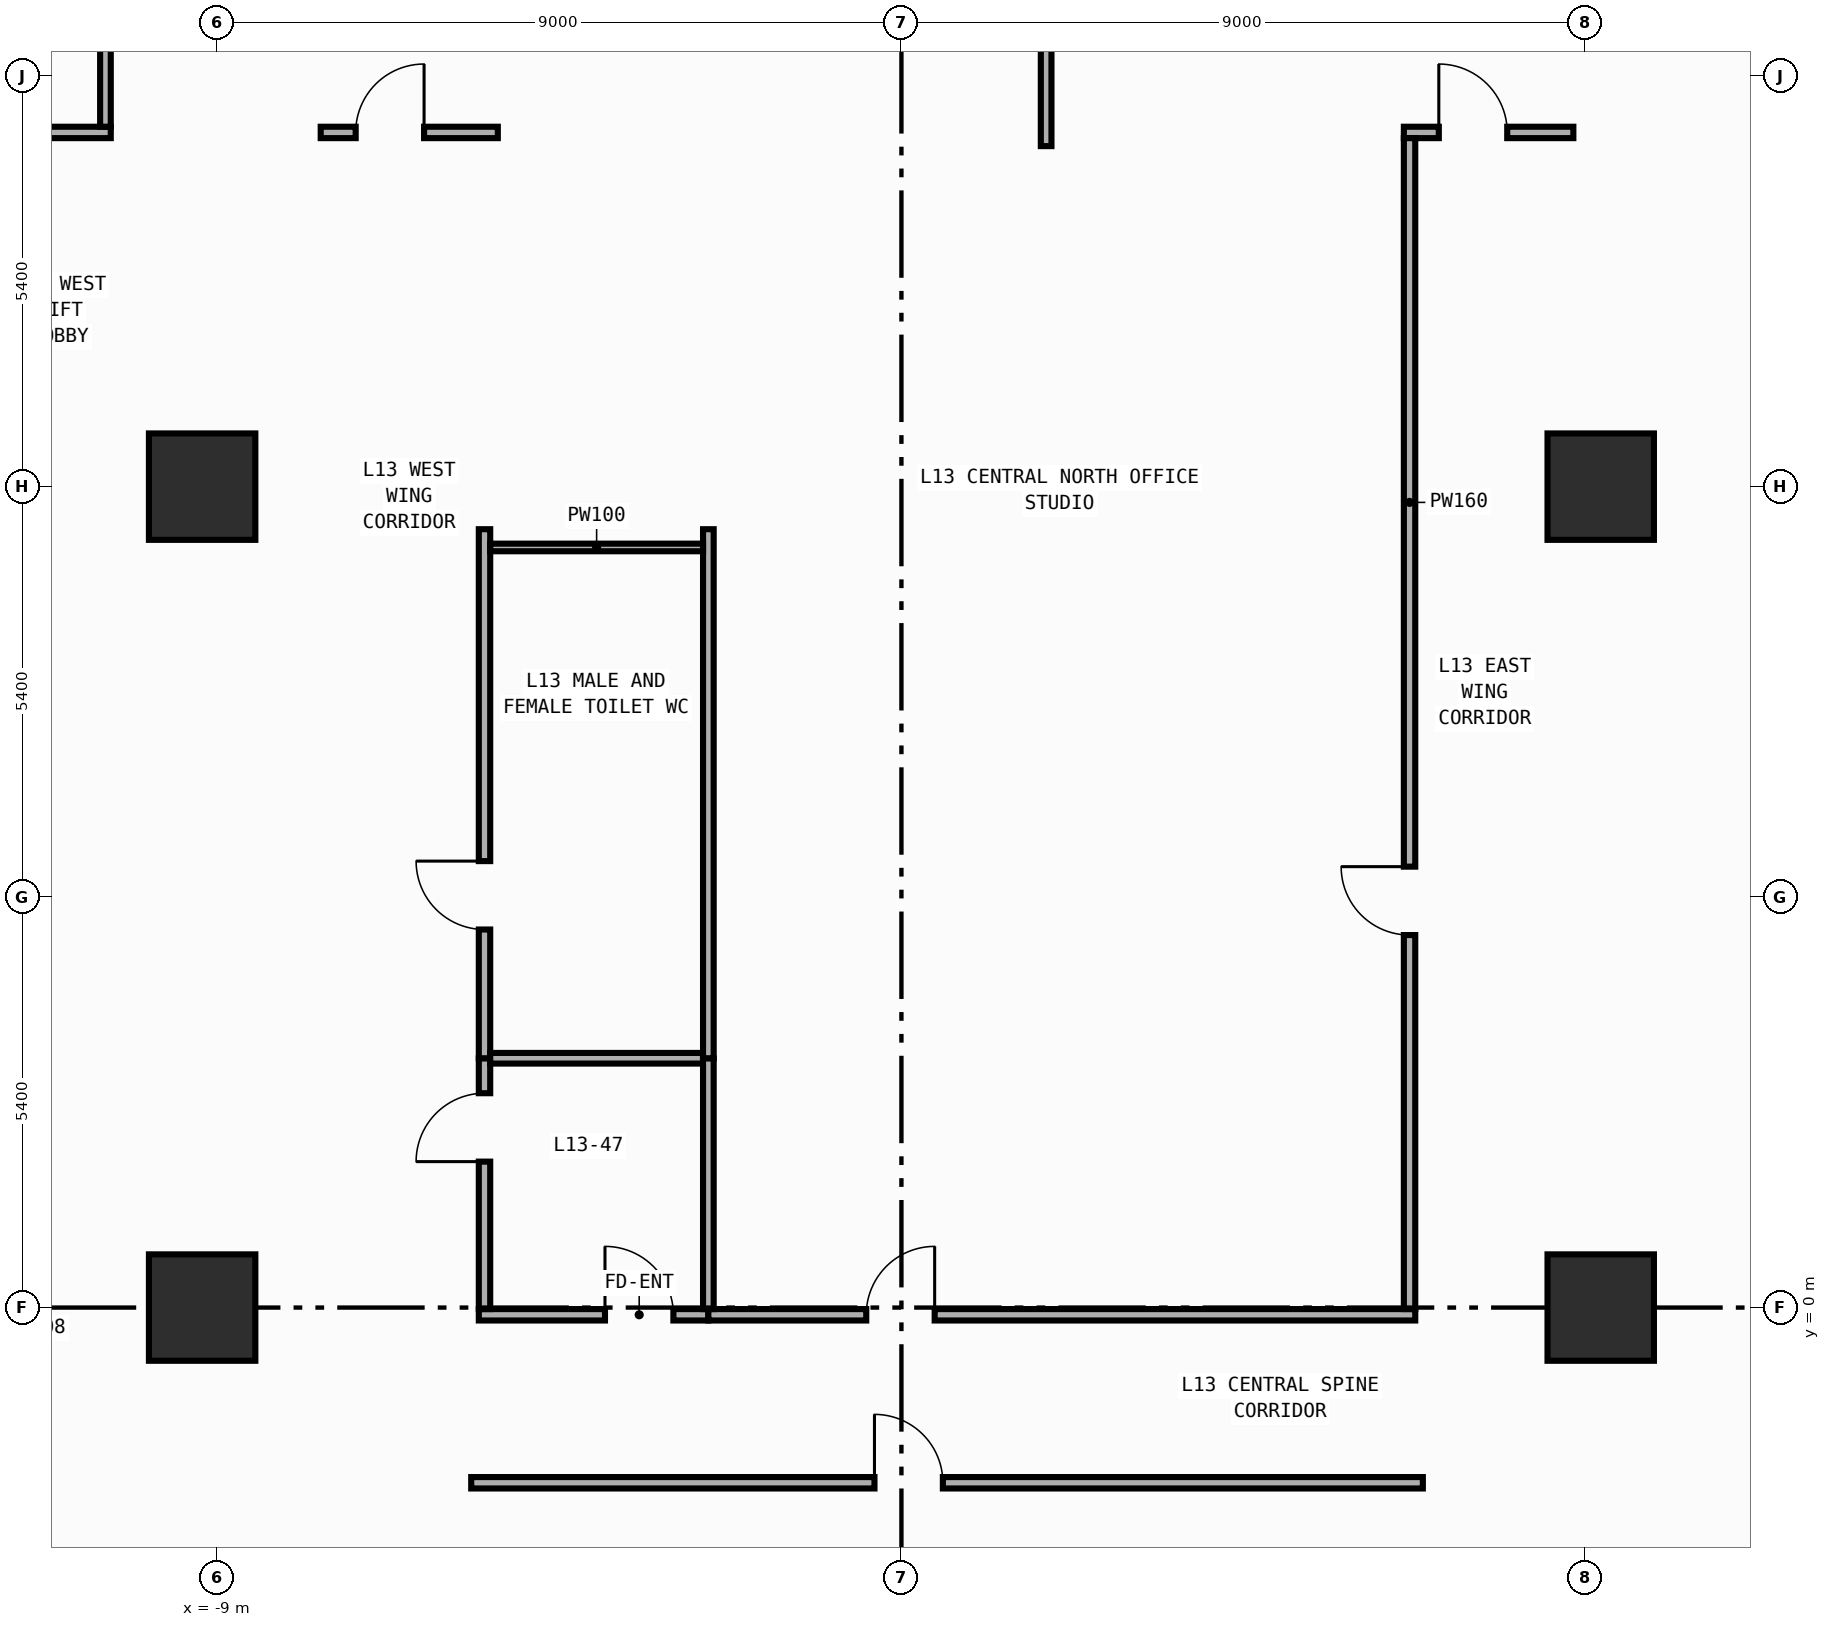
"""IFC4 building model, lengths in metres.
Left out: names, types, materials, properties, quantities, classifications, styles, units other than length and angle.
Written with IfcOpenShell. Run it as: python <this file> out.ifc"""

import sys

from ifc_helpers import new_model, si_unit, direction, frame, frame_2d, origin, origin_2d, place, context, subcontext, project, spatial, rectangle, extrude, element, fill, save


model = new_model("IFC4")
c1 = context("Model", 3, precision=1e-05, world=origin(), true_north=direction((0.0, 1.0)))
c2 = subcontext(c1, "Body", "Model", "MODEL_VIEW")
j1 = project(units=[si_unit("LENGTHUNIT", "METRE"), si_unit("PLANEANGLEUNIT", "RADIAN")], contexts=[c1])
p1 = place(None, origin())
s1 = spatial("IfcSite", under=j1, at=p1, CompositionType="ELEMENT")
p2 = place(p1, origin())
s2 = spatial("IfcBuilding", under=s1, at=p2, CompositionType="ELEMENT")
p3 = place(p2, frame((0.0, 0.0, 55.4)))
s3 = spatial("IfcBuildingStorey", under=s2, at=p3, CompositionType="ELEMENT", Elevation=55.4)
for number, where, z_axis, x_axis in (
    (1, (-9.2, 0.0, 0.0), (0.0, 0.0, 1.0), (1.0, 0.0, 0.0)),
    (2, (-9.2, 10.8, 0.0), (0.0, 0.0, 1.0), (1.0, 0.0, 0.0)),
    (3, (9.2, 0.0, 0.0), (0.0, 0.0, 1.0), (1.0, 0.0, 0.0)),
    (4, (9.2, 10.8, 0.0), (0.0, 0.0, 1.0), (1.0, 0.0, 0.0)),
):
    element("IfcColumn", number, at=place(p3, frame(where, z_axis=z_axis, x_axis=x_axis)), inside=s3, PredefinedType="COLUMN", context=c2, shape_type="SweptSolid", body=[
        extrude(rectangle(XDim=1.4, YDim=1.4, at=origin_2d()), origin(), (0.0, 0.0, 1.0), 4.2),
    ])
p4 = place(p3, frame((-11.99, 15.46, 0.0), z_axis=(0.0, 0.0, 1.0), x_axis=(1.0, 0.0, 0.0)))
e5 = element("IfcWall", 5, at=p4, inside=s3, PredefinedType="PARTITIONING", context=c2, shape_type="SweptSolid", body=[
    extrude(rectangle(XDim=1.588, YDim=0.15, at=frame_2d((0.794, 0.0))), origin(), (0.0, 0.0, 1.0), 3.94),
])
p5 = place(p3, frame((-5.56, -0.095, 0.0), z_axis=(0.0, 0.0, 1.0), x_axis=(1.0, 0.0, 0.0)))
e6 = element("IfcWall", 6, at=p5, inside=s3, PredefinedType="PARTITIONING", context=c2, shape_type="SweptSolid", body=[
    extrude(rectangle(XDim=3.02, YDim=0.15, at=frame_2d((1.51, 0.0))), origin(), (0.0, 0.0, 1.0), 3.14),
])
p6 = place(p5, frame((1.66, 0.0, 0.0)))
e7 = element("IfcOpeningElement", 7, at=p6, cuts=e6, PredefinedType="OPENING", context=c2, shape_type="SweptSolid", body=[
    extrude(rectangle(XDim=0.9, YDim=2.15, at=frame_2d((0.45, 1.075))), frame((0.0, 0.085, 0.0), z_axis=(0.0, -1.0, 0.0), x_axis=(1.0, 0.0, 0.0)), (0.0, 0.0, 1.0), 0.17),
])
p7 = place(p3, frame((-2.54, -0.095, 0.0), z_axis=(0.0, 0.0, 1.0), x_axis=(1.0, 0.0, 0.0)))
e8 = element("IfcWall", 8, at=p7, inside=s3, PredefinedType="PARTITIONING", context=c2, shape_type="SweptSolid", body=[
    extrude(rectangle(XDim=9.3, YDim=0.15, at=frame_2d((4.65, 0.0))), origin(), (0.0, 0.0, 1.0), 3.14),
])
p8 = place(p7, frame((2.077, 0.0, 0.0)))
e9 = element("IfcOpeningElement", 9, at=p8, cuts=e8, PredefinedType="OPENING", context=c2, shape_type="SweptSolid", body=[
    extrude(rectangle(XDim=0.9, YDim=2.15, at=frame_2d((0.45, 1.075))), frame((0.0, 0.085, 0.0), z_axis=(0.0, -1.0, 0.0), x_axis=(1.0, 0.0, 0.0)), (0.0, 0.0, 1.0), 0.17),
])
p9 = place(p3, frame((-5.66, -2.305, 0.0), z_axis=(0.0, 0.0, 1.0), x_axis=(1.0, 0.0, 0.0)))
e10 = element("IfcWall", 10, at=p9, inside=s3, PredefinedType="PARTITIONING", context=c2, shape_type="SweptSolid", body=[
    extrude(rectangle(XDim=12.52, YDim=0.15, at=frame_2d((6.26, 0.0))), origin(), (0.0, 0.0, 1.0), 3.94),
])
p10 = place(p9, frame((5.305, 0.0, 0.0)))
e11 = element("IfcOpeningElement", 11, at=p10, cuts=e10, PredefinedType="OPENING", context=c2, shape_type="SweptSolid", body=[
    extrude(rectangle(XDim=0.9, YDim=2.15, at=frame_2d((0.45, 1.075))), frame((0.0, 0.085, 0.0), z_axis=(0.0, -1.0, 0.0), x_axis=(1.0, 0.0, 0.0)), (0.0, 0.0, 1.0), 0.17),
])
p11 = place(p3, frame((-7.64, 15.46, 0.0), z_axis=(0.0, 0.0, 1.0), x_axis=(1.0, 0.0, 0.0)))
e12 = element("IfcWall", 12, at=p11, inside=s3, PredefinedType="PARTITIONING", context=c2, shape_type="SweptSolid", body=[
    extrude(rectangle(XDim=2.33, YDim=0.15, at=frame_2d((1.165, 0.0))), origin(), (0.0, 0.0, 1.0), 3.94),
])
p12 = place(p11, frame((0.46, 0.0, 0.0)))
e13 = element("IfcOpeningElement", 13, at=p12, cuts=e12, PredefinedType="OPENING", context=c2, shape_type="SweptSolid", body=[
    extrude(rectangle(XDim=0.9, YDim=2.15, at=frame_2d((0.45, 1.075))), frame((0.0, 0.085, 0.0), z_axis=(0.0, -1.0, 0.0), x_axis=(1.0, 0.0, 0.0)), (0.0, 0.0, 1.0), 0.17),
])
p13 = place(p3, frame((-5.485, -0.02, 0.0), z_axis=(0.0, 0.0, 1.0), x_axis=(0.0, 1.0, 0.0)))
e14 = element("IfcWall", 14, at=p13, inside=s3, PredefinedType="PARTITIONING", context=c2, shape_type="SweptSolid", body=[
    extrude(rectangle(XDim=3.3, YDim=0.15, at=frame_2d((1.65, 0.0))), origin(), (0.0, 0.0, 1.0), 3.94),
])
p14 = place(p13, frame((1.94, 0.0, 0.0)))
e15 = element("IfcOpeningElement", 15, at=p14, cuts=e14, PredefinedType="OPENING", context=c2, shape_type="SweptSolid", body=[
    extrude(rectangle(XDim=0.9, YDim=2.15, at=frame_2d((0.45, 1.075))), frame((0.0, 0.085, 0.0), z_axis=(0.0, -1.0, 0.0), x_axis=(1.0, 0.0, 0.0)), (0.0, 0.0, 1.0), 0.17),
])
p15 = place(p3, frame((-5.485, 3.28, 0.0), z_axis=(0.0, 0.0, 1.0), x_axis=(0.0, 1.0, 0.0)))
e16 = element("IfcWall", 16, at=p15, inside=s3, PredefinedType="PARTITIONING", context=c2, shape_type="SweptSolid", body=[
    extrude(rectangle(XDim=6.96, YDim=0.15, at=frame_2d((3.48, 0.0))), origin(), (0.0, 0.0, 1.0), 3.94),
])
p16 = place(p15, frame((1.694, 0.0, 0.0)))
e17 = element("IfcOpeningElement", 17, at=p16, cuts=e16, PredefinedType="OPENING", context=c2, shape_type="SweptSolid", body=[
    extrude(rectangle(XDim=0.9, YDim=2.15, at=frame_2d((0.45, 1.075))), frame((0.0, 0.085, 0.0), z_axis=(0.0, -1.0, 0.0), x_axis=(1.0, 0.0, 0.0)), (0.0, 0.0, 1.0), 0.17),
])
p17 = place(p3, frame((6.61, 15.46, 0.0), z_axis=(0.0, 0.0, 1.0), x_axis=(1.0, 0.0, 0.0)))
e18 = element("IfcWall", 18, at=p17, inside=s3, PredefinedType="PARTITIONING", context=c2, shape_type="SweptSolid", body=[
    extrude(rectangle(XDim=2.23, YDim=0.15, at=frame_2d((1.115, 0.0))), origin(), (0.0, 0.0, 1.0), 3.94),
])
p18 = place(p17, frame((0.46, 0.0, 0.0)))
e19 = element("IfcOpeningElement", 19, at=p18, cuts=e18, PredefinedType="OPENING", context=c2, shape_type="SweptSolid", body=[
    extrude(rectangle(XDim=0.9, YDim=2.15, at=frame_2d((0.45, 1.075))), frame((0.0, 0.085, 0.0), z_axis=(0.0, -1.0, 0.0), x_axis=(1.0, 0.0, 0.0)), (0.0, 0.0, 1.0), 0.17),
])
p19 = place(p3, frame((6.685, -0.02, 0.0), z_axis=(0.0, 0.0, 1.0), x_axis=(0.0, 1.0, 0.0)))
e20 = element("IfcWall", 20, at=p19, inside=s3, PredefinedType="PARTITIONING", context=c2, shape_type="SweptSolid", body=[
    extrude(rectangle(XDim=15.405, YDim=0.15, at=frame_2d((7.703, 0.0))), origin(), (0.0, 0.0, 1.0), 3.94),
])
p20 = place(p19, frame((4.921, 0.0, 0.0)))
e21 = element("IfcOpeningElement", 21, at=p20, cuts=e20, PredefinedType="OPENING", context=c2, shape_type="SweptSolid", body=[
    extrude(rectangle(XDim=0.9, YDim=2.15, at=frame_2d((0.45, 1.075))), frame((0.0, 0.085, 0.0), z_axis=(0.0, -1.0, 0.0), x_axis=(1.0, 0.0, 0.0)), (0.0, 0.0, 1.0), 0.17),
])
p21 = place(p3, frame((-10.472, 15.535, 0.0), z_axis=(0.0, 0.0, 1.0), x_axis=(0.0, 1.0, 0.0)))
e22 = element("IfcWall", 22, at=p21, inside=s3, PredefinedType="PARTITIONING", context=c2, shape_type="SweptSolid", body=[
    extrude(rectangle(XDim=11.32, YDim=0.14, at=frame_2d((5.66, 0.0))), origin(), (0.0, 0.0, 1.0), 3.94),
])
p22 = place(p3, frame((1.904, 15.28, 0.0), z_axis=(0.0, 0.0, 1.0), x_axis=(0.0, 1.0, 0.0)))
e23 = element("IfcWall", 23, at=p22, inside=s3, PredefinedType="PARTITIONING", context=c2, shape_type="SweptSolid", body=[
    extrude(rectangle(XDim=11.575, YDim=0.14, at=frame_2d((5.788, 0.0))), origin(), (0.0, 0.0, 1.0), 3.94),
])
p23 = place(p3, frame((-5.41, 3.28, 0.0), z_axis=(0.0, 0.0, 1.0), x_axis=(1.0, 0.0, 0.0)))
e24 = element("IfcWall", 24, at=p23, inside=s3, PredefinedType="PARTITIONING", context=c2, shape_type="SweptSolid", body=[
    extrude(rectangle(XDim=2.8, YDim=0.14, at=frame_2d((1.4, 0.0))), origin(), (0.0, 0.0, 1.0), 3.94),
])
p24 = place(p3, frame((-2.54, -0.02, 0.0), z_axis=(0.0, 0.0, 1.0), x_axis=(0.0, 1.0, 0.0)))
e25 = element("IfcWall", 25, at=p24, inside=s3, PredefinedType="PARTITIONING", context=c2, shape_type="SweptSolid", body=[
    extrude(rectangle(XDim=3.3, YDim=0.14, at=frame_2d((1.65, 0.0))), origin(), (0.0, 0.0, 1.0), 3.94),
])
p25 = place(p3, frame((-2.54, 3.28, 0.0), z_axis=(0.0, 0.0, 1.0), x_axis=(0.0, 1.0, 0.0)))
e26 = element("IfcWall", 26, at=p25, inside=s3, PredefinedType="PARTITIONING", context=c2, shape_type="SweptSolid", body=[
    extrude(rectangle(XDim=6.96, YDim=0.14, at=frame_2d((3.48, 0.0))), origin(), (0.0, 0.0, 1.0), 3.94),
])
p26 = place(p3, frame((-5.41, 10.0, 0.0), z_axis=(0.0, 0.0, 1.0), x_axis=(1.0, 0.0, 0.0)))
e27 = element("IfcWall", 27, at=p26, inside=s3, PredefinedType="PARTITIONING", context=c2, shape_type="SweptSolid", body=[
    extrude(rectangle(XDim=2.8, YDim=0.1, at=frame_2d((1.4, 0.0))), origin(), (0.0, 0.0, 1.0), 3.94),
])
p27 = place(p6, origin())
e28 = element("IfcDoor", 28, at=p27, inside=s3, OperationType="SINGLE_SWING_LEFT", PredefinedType="DOOR", context=c2, shape_type="SweptSolid", body=[
    extrude(rectangle(XDim=0.9, YDim=2.15, at=frame_2d((0.45, 1.075))), frame((0.0, 0.025, 0.0), z_axis=(0.0, -1.0, 0.0), x_axis=(1.0, 0.0, 0.0)), (0.0, 0.0, 1.0), 0.05),
])
fill(e7, e28)
p28 = place(p8, origin())
e29 = element("IfcDoor", 29, at=p28, inside=s3, OperationType="SINGLE_SWING_RIGHT", PredefinedType="DOOR", context=c2, shape_type="SweptSolid", body=[
    extrude(rectangle(XDim=0.9, YDim=2.15, at=frame_2d((0.45, 1.075))), frame((0.0, 0.025, 0.0), z_axis=(0.0, -1.0, 0.0), x_axis=(1.0, 0.0, 0.0)), (0.0, 0.0, 1.0), 0.05),
])
fill(e9, e29)
p29 = place(p10, origin())
e30 = element("IfcDoor", 30, at=p29, inside=s3, OperationType="SINGLE_SWING_LEFT", PredefinedType="DOOR", context=c2, shape_type="SweptSolid", body=[
    extrude(rectangle(XDim=0.9, YDim=2.15, at=frame_2d((0.45, 1.075))), frame((0.0, 0.025, 0.0), z_axis=(0.0, -1.0, 0.0), x_axis=(1.0, 0.0, 0.0)), (0.0, 0.0, 1.0), 0.05),
])
fill(e11, e30)
p30 = place(p12, origin())
e31 = element("IfcDoor", 31, at=p30, inside=s3, OperationType="SINGLE_SWING_RIGHT", PredefinedType="DOOR", context=c2, shape_type="SweptSolid", body=[
    extrude(rectangle(XDim=0.9, YDim=2.15, at=frame_2d((0.45, 1.075))), frame((0.0, 0.025, 0.0), z_axis=(0.0, -1.0, 0.0), x_axis=(1.0, 0.0, 0.0)), (0.0, 0.0, 1.0), 0.05),
])
fill(e13, e31)
p31 = place(p14, origin())
e32 = element("IfcDoor", 32, at=p31, inside=s3, OperationType="SINGLE_SWING_LEFT", PredefinedType="DOOR", context=c2, shape_type="SweptSolid", body=[
    extrude(rectangle(XDim=0.9, YDim=2.15, at=frame_2d((0.45, 1.075))), frame((0.0, 0.025, 0.0), z_axis=(0.0, -1.0, 0.0), x_axis=(1.0, 0.0, 0.0)), (0.0, 0.0, 1.0), 0.05),
])
fill(e15, e32)
p32 = place(p16, origin())
e33 = element("IfcDoor", 33, at=p32, inside=s3, OperationType="SINGLE_SWING_RIGHT", PredefinedType="DOOR", context=c2, shape_type="SweptSolid", body=[
    extrude(rectangle(XDim=0.9, YDim=2.15, at=frame_2d((0.45, 1.075))), frame((0.0, 0.025, 0.0), z_axis=(0.0, -1.0, 0.0), x_axis=(1.0, 0.0, 0.0)), (0.0, 0.0, 1.0), 0.05),
])
fill(e17, e33)
p33 = place(p18, origin())
e34 = element("IfcDoor", 34, at=p33, inside=s3, OperationType="SINGLE_SWING_LEFT", PredefinedType="DOOR", context=c2, shape_type="SweptSolid", body=[
    extrude(rectangle(XDim=0.9, YDim=2.15, at=frame_2d((0.45, 1.075))), frame((0.0, 0.025, 0.0), z_axis=(0.0, -1.0, 0.0), x_axis=(1.0, 0.0, 0.0)), (0.0, 0.0, 1.0), 0.05),
])
fill(e19, e34)
p34 = place(p20, origin())
e35 = element("IfcDoor", 35, at=p34, inside=s3, OperationType="SINGLE_SWING_RIGHT", PredefinedType="DOOR", context=c2, shape_type="SweptSolid", body=[
    extrude(rectangle(XDim=0.9, YDim=2.15, at=frame_2d((0.45, 1.075))), frame((0.0, 0.025, 0.0), z_axis=(0.0, -1.0, 0.0), x_axis=(1.0, 0.0, 0.0)), (0.0, 0.0, 1.0), 0.05),
])
fill(e21, e35)
save(model, sys.argv[1])
